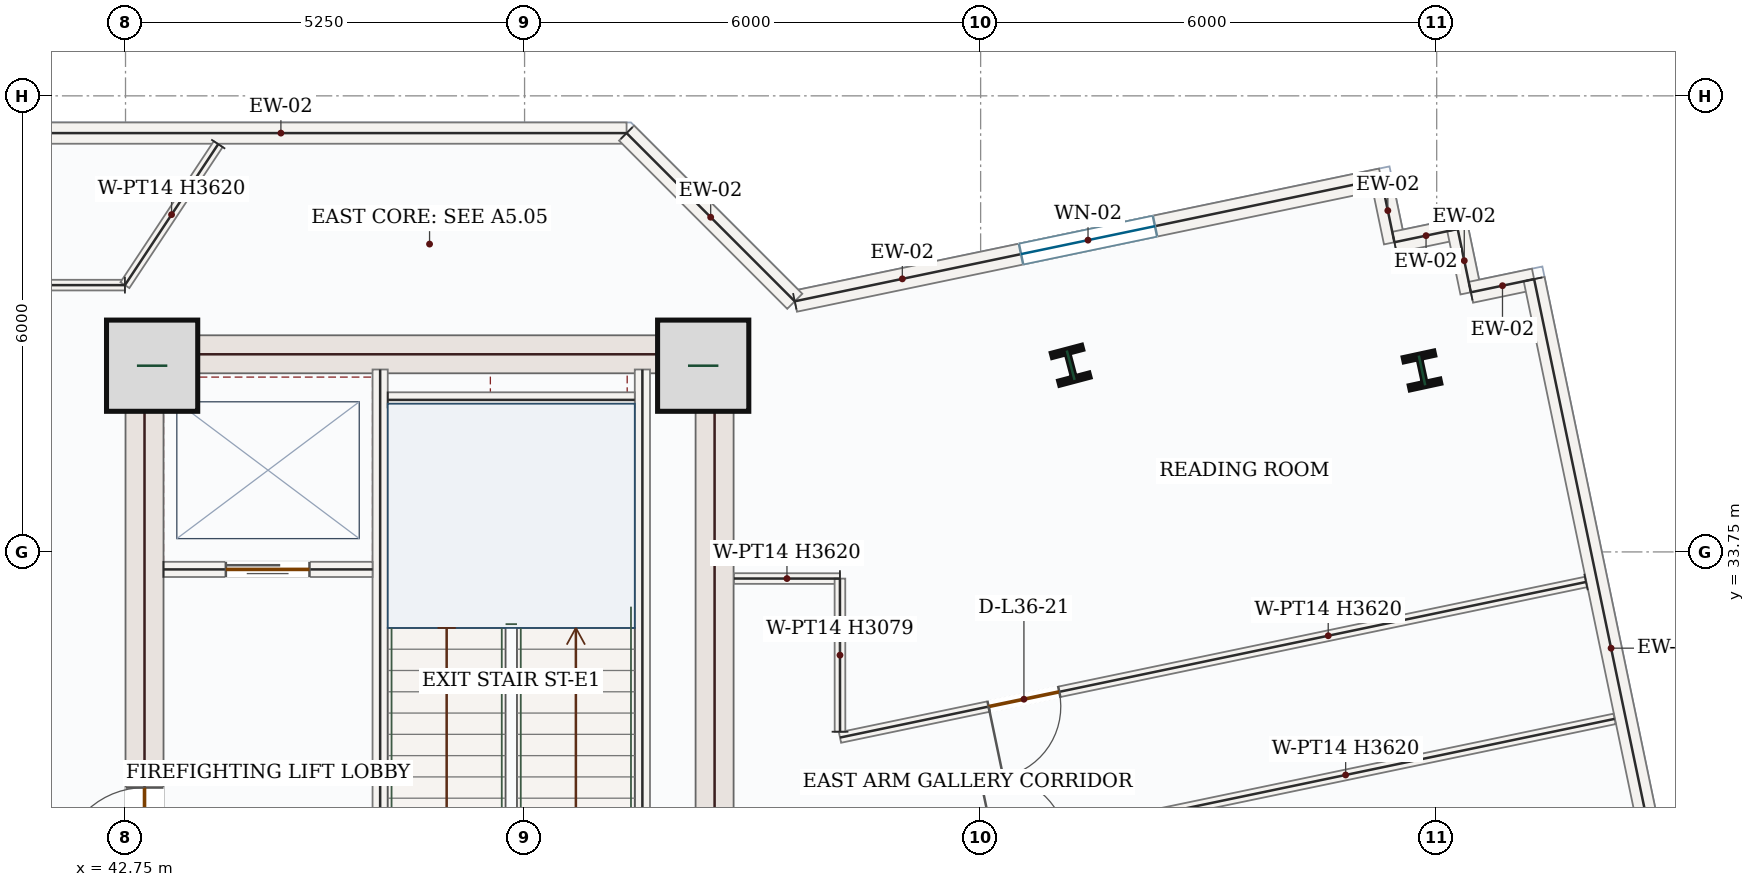
"""IFC4 building model, lengths in metres.
Left out: names, types, materials, properties, quantities, classifications, styles, units other than length and angle.
Written with IfcOpenShell. Run it as: python <this file> out.ifc"""

import sys

from ifc_helpers import new_model, si_unit, direction, frame, frame_2d, origin, origin_2d, place, context, subcontext, project, spatial, rectangle, i_section, extrude, source, transform, mapped, element, fill, save


model = new_model("IFC4")
c1 = context("Model", 3, precision=1e-05, world=origin(), true_north=direction((0.0, 1.0)))
c2 = subcontext(c1, "Body", "Model", "MODEL_VIEW")
j1 = project(units=[si_unit("LENGTHUNIT", "METRE"), si_unit("PLANEANGLEUNIT", "RADIAN")], contexts=[c1])
p1 = place(None, origin())
s1 = spatial("IfcSite", under=j1, at=p1, CompositionType="ELEMENT")
p2 = place(p1, origin())
s2 = spatial("IfcBuilding", under=s1, at=p2, CompositionType="ELEMENT")
p3 = place(p2, frame((0.0, 0.0, 159.0)))
s3 = spatial("IfcBuildingStorey", under=s2, at=p3, CompositionType="ELEMENT", Elevation=159.0)
p4 = place(p3, frame((43.0, 28.05, 0.0), z_axis=(0.0, 0.0, 1.0), x_axis=(0.0, 1.0, 0.0)))
e1 = element("IfcWall", 1, at=p4, inside=s3, PredefinedType="SHEAR", context=c2, shape_type="SweptSolid", body=[
    extrude(rectangle(XDim=8.55, YDim=0.5, at=frame_2d((4.275, 0.0))), origin(), (0.0, 0.0, 1.0), 3.62),
])
p5 = place(p4, frame((1.5, 0.0, 0.0)))
e2 = element("IfcOpeningElement", 2, at=p5, cuts=e1, PredefinedType="OPENING", context=c2, shape_type="SweptSolid", body=[
    extrude(rectangle(XDim=1.1, YDim=2.2, at=frame_2d((0.55, 1.1))), frame((0.0, 0.26, 0.0), z_axis=(0.0, -1.0, 0.0), x_axis=(1.0, 0.0, 0.0)), (0.0, 0.0, 1.0), 0.52),
])
m1 = source(origin(), c2, "Body", "SweptSolid", [
    extrude(rectangle(XDim=8.55, YDim=0.5, at=frame_2d((4.275, 0.0))), origin(), (0.0, 0.0, 1.0), 3.62),
])
p6 = place(p3, frame((50.5, 28.05, 0.0), z_axis=(0.0, 0.0, 1.0), x_axis=(0.0, 1.0, 0.0)))
e3 = element("IfcWall", 3, at=p6, inside=s3, PredefinedType="SHEAR", context=c2, shape_type="MappedRepresentation", body=[
    mapped(m1, transform((0.0, 0.0, 0.0), x_axis=(1.0, 0.0, 0.0), y_axis=(0.0, 1.0, 0.0), z_axis=(0.0, 0.0, 1.0), scale=1.0)),
])
m2 = source(origin(), c2, "Body", "SweptSolid", [
    extrude(rectangle(XDim=7.0, YDim=0.5, at=frame_2d((3.5, 0.0))), origin(), (0.0, 0.0, 1.0), 3.62),
])
p7 = place(p3, frame((43.25, 36.35, 0.0), z_axis=(0.0, 0.0, 1.0), x_axis=(1.0, 0.0, 0.0)))
e4 = element("IfcWall", 4, at=p7, inside=s3, PredefinedType="SHEAR", context=c2, shape_type="MappedRepresentation", body=[
    mapped(m2, transform((0.0, 0.0, 0.0), x_axis=(1.0, 0.0, 0.0), y_axis=(0.0, 1.0, 0.0), z_axis=(0.0, 0.0, 1.0), scale=1.0)),
])
m3 = source(origin(), c2, "Body", "SweptSolid", [
    extrude(rectangle(XDim=1.2, YDim=1.2, at=origin_2d()), origin(), (0.0, 0.0, 1.0), 3.9),
])
for number, where, z_axis, x_axis in (
    (5, (43.1, 36.2, 0.0), (0.0, 0.0, 1.0), (1.0, 0.0, 0.0)),
    (6, (50.35, 36.2, 0.0), (0.0, 0.0, 1.0), (1.0, 0.0, 0.0)),
):
    element("IfcColumn", number, at=place(p3, frame(where, z_axis=z_axis, x_axis=x_axis)), inside=s3, PredefinedType="COLUMN", context=c2, shape_type="MappedRepresentation", body=[
        mapped(m3, transform((0.0, 0.0, 0.0), x_axis=(1.0, 0.0, 0.0), y_axis=(0.0, 1.0, 0.0), z_axis=(0.0, 0.0, 1.0), scale=1.0)),
    ])
m4 = source(origin(), c2, "Body", "SweptSolid", [
    extrude(i_section(OverallWidth=0.412, OverallDepth=0.435, WebThickness=0.036, FlangeThickness=0.057, FilletRadius=0.018, at=origin_2d()), origin(), (0.0, 0.0, 1.0), 3.9),
])
for number, where, z_axis, x_axis in (
    (7, (55.185, 36.206, 0.0), (0.0, 0.0, 1.0), (0.967, 0.255, 0.0)),
    (8, (59.807, 36.137, 0.0), (0.0, 0.0, 1.0), (0.977, 0.211, 0.0)),
):
    element("IfcColumn", number, at=place(p3, frame(where, z_axis=z_axis, x_axis=x_axis)), inside=s3, PredefinedType="COLUMN", context=c2, shape_type="MappedRepresentation", body=[
        mapped(m4, transform((0.0, 0.0, 0.0), x_axis=(1.0, 0.0, 0.0), y_axis=(0.0, 1.0, 0.0), z_axis=(0.0, 0.0, 1.0), scale=1.0)),
    ])
p8 = place(p3, frame((51.555, 37.047, 0.0), z_axis=(0.0, 0.0, 1.0), x_axis=(0.978938136474, 0.204157108515, 0.0)))
e9 = element("IfcWall", 9, at=p8, inside=s3, PredefinedType="SOLIDWALL", context=c2, shape_type="SweptSolid", body=[
    extrude(rectangle(XDim=7.882, YDim=0.28, at=frame_2d((3.941, 0.0))), origin(), (0.0, 0.0, 1.0), 3.62),
])
p9 = place(p8, frame((3.041, 0.0, 0.85)))
e10 = element("IfcOpeningElement", 10, at=p9, cuts=e9, PredefinedType="OPENING", context=c2, shape_type="SweptSolid", body=[
    extrude(rectangle(XDim=1.8, YDim=1.75, at=frame_2d((0.9, 0.875))), frame((0.0, 0.15, 0.0), z_axis=(0.0, -1.0, 0.0), x_axis=(1.0, 0.0, 0.0)), (0.0, 0.0, 1.0), 0.3),
])
m5 = source(origin(), c2, "Body", "SweptSolid", [
    extrude(rectangle(XDim=0.85, YDim=0.28, at=frame_2d((0.425, 0.0))), origin(), (0.0, 0.0, 1.0), 3.62),
])
for number, where, z_axis, x_axis in (
    (11, (59.271, 38.656, 0.0), (0.0, 0.0, 1.0), (0.204, -0.979, 0.0)),
    (12, (59.444, 37.824, 0.0), (0.0, 0.0, 1.0), (0.979, 0.204, 0.0)),
):
    element("IfcWall", number, at=place(p3, frame(where, z_axis=z_axis, x_axis=x_axis)), inside=s3, PredefinedType="SOLIDWALL", context=c2, shape_type="MappedRepresentation", body=[
        mapped(m5, transform((0.0, 0.0, 0.0), x_axis=(1.0, 0.0, 0.0), y_axis=(0.0, 1.0, 0.0), z_axis=(0.0, 0.0, 1.0), scale=1.0)),
    ])
m6 = source(origin(), c2, "Body", "SweptSolid", [
    extrude(rectangle(XDim=0.85, YDim=0.28, at=frame_2d((0.425, 0.0))), origin(), (0.0, 0.0, 1.0), 3.62),
])
p10 = place(p3, frame((60.276, 37.998, 0.0), z_axis=(0.0, 0.0, 1.0), x_axis=(0.204447295999, -0.978877573121, 0.0)))
e13 = element("IfcWall", 13, at=p10, inside=s3, PredefinedType="SOLIDWALL", context=c2, shape_type="MappedRepresentation", body=[
    mapped(m6, transform((0.0, 0.0, 0.0), x_axis=(1.0, 0.0, 0.0), y_axis=(0.0, 1.0, 0.0), z_axis=(0.0, 0.0, 1.0), scale=1.0)),
])
p11 = place(p3, frame((60.45, 37.166, 0.0), z_axis=(0.0, 0.0, 1.0), x_axis=(0.978923028084, 0.20422954019, 0.0)))
e14 = element("IfcWall", 14, at=p11, inside=s3, PredefinedType="SOLIDWALL", context=c2, shape_type="MappedRepresentation", body=[
    mapped(m5, transform((0.0, 0.0, 0.0), x_axis=(1.0, 0.0, 0.0), y_axis=(0.0, 1.0, 0.0), z_axis=(0.0, 0.0, 1.0), scale=1.0)),
])
m7 = source(origin(), c2, "Body", "SweptSolid", [
    extrude(rectangle(XDim=9.92, YDim=0.28, at=frame_2d((4.96, 0.0))), origin(), (0.0, 0.0, 1.0), 3.62),
])
p12 = place(p3, frame((61.282, 37.339, 0.0), z_axis=(0.0, 0.0, 1.0), x_axis=(0.204150812873, -0.978939449406, 0.0)))
e15 = element("IfcWall", 15, at=p12, inside=s3, PredefinedType="SOLIDWALL", context=c2, shape_type="MappedRepresentation", body=[
    mapped(m7, transform((0.0, 0.0, 0.0), x_axis=(1.0, 0.0, 0.0), y_axis=(0.0, 1.0, 0.0), z_axis=(0.0, 0.0, 1.0), scale=1.0)),
])
m8 = source(origin(), c2, "Body", "SweptSolid", [
    extrude(rectangle(XDim=9.095, YDim=0.28, at=frame_2d((4.548, 0.0))), origin(), (0.0, 0.0, 1.0), 3.62),
])
p13 = place(p3, frame((40.247, 39.26, 0.0), z_axis=(0.0, 0.0, 1.0), x_axis=(1.0, 0.0, 0.0)))
e16 = element("IfcWall", 16, at=p13, inside=s3, PredefinedType="SOLIDWALL", context=c2, shape_type="MappedRepresentation", body=[
    mapped(m8, transform((0.0, 0.0, 0.0), x_axis=(1.0, 0.0, 0.0), y_axis=(0.0, 1.0, 0.0), z_axis=(0.0, 0.0, 1.0), scale=1.0)),
])
m9 = source(origin(), c2, "Body", "SweptSolid", [
    extrude(rectangle(XDim=3.129, YDim=0.28, at=frame_2d((1.565, 0.0))), origin(), (0.0, 0.0, 1.0), 3.62),
])
p14 = place(p3, frame((49.342, 39.26, 0.0), z_axis=(0.0, 0.0, 1.0), x_axis=(0.707067771627, -0.707145788594, 0.0)))
e17 = element("IfcWall", 17, at=p14, inside=s3, PredefinedType="SOLIDWALL", context=c2, shape_type="MappedRepresentation", body=[
    mapped(m9, transform((0.0, 0.0, 0.0), x_axis=(1.0, 0.0, 0.0), y_axis=(0.0, 1.0, 0.0), z_axis=(0.0, 0.0, 1.0), scale=1.0)),
])
m10 = source(origin(), c2, "Body", "SweptSolid", [
    extrude(rectangle(XDim=7.87, YDim=0.2, at=frame_2d((3.935, 0.0))), origin(), (0.0, 0.0, 1.0), 3.62),
])
p15 = place(p3, frame((49.55, 28.28, 0.0), z_axis=(0.0, 0.0, 1.0), x_axis=(0.0, 1.0, 0.0)))
e18 = element("IfcWall", 18, at=p15, inside=s3, PredefinedType="SOLIDWALL", context=c2, shape_type="MappedRepresentation", body=[
    mapped(m10, transform((0.0, 0.0, 0.0), x_axis=(1.0, 0.0, 0.0), y_axis=(0.0, 1.0, 0.0), z_axis=(0.0, 0.0, 1.0), scale=1.0)),
])
p16 = place(p3, frame((46.1, 28.15, 0.0), z_axis=(0.0, 0.0, 1.0), x_axis=(0.0, 1.0, 0.0)))
e19 = element("IfcWall", 19, at=p16, inside=s3, PredefinedType="SOLIDWALL", context=c2, shape_type="SweptSolid", body=[
    extrude(rectangle(XDim=8.0, YDim=0.2, at=frame_2d((4.0, 0.0))), origin(), (0.0, 0.0, 1.0), 3.62),
])
p17 = place(p16, frame((0.4, 0.0, 0.0)))
e20 = element("IfcOpeningElement", 20, at=p17, cuts=e19, PredefinedType="OPENING", context=c2, shape_type="SweptSolid", body=[
    extrude(rectangle(XDim=1.05, YDim=2.15, at=frame_2d((0.525, 1.075))), frame((0.0, 0.11, 0.0), z_axis=(0.0, -1.0, 0.0), x_axis=(1.0, 0.0, 0.0)), (0.0, 0.0, 1.0), 0.22),
])
m11 = source(origin(), c2, "Body", "SweptSolid", [
    extrude(rectangle(XDim=3.25, YDim=0.2, at=frame_2d((1.625, 0.0))), origin(), (0.0, 0.0, 1.0), 3.62),
])
p18 = place(p3, frame((46.2, 35.75, 0.0), z_axis=(0.0, 0.0, 1.0), x_axis=(1.0, 0.0, 0.0)))
e21 = element("IfcWall", 21, at=p18, inside=s3, PredefinedType="SOLIDWALL", context=c2, shape_type="MappedRepresentation", body=[
    mapped(m11, transform((0.0, 0.0, 0.0), x_axis=(1.0, 0.0, 0.0), y_axis=(0.0, 1.0, 0.0), z_axis=(0.0, 0.0, 1.0), scale=1.0)),
])
p19 = place(p3, frame((43.25, 33.52, 0.0), z_axis=(0.0, 0.0, 1.0), x_axis=(1.0, 0.0, 0.0)))
e22 = element("IfcWall", 22, at=p19, inside=s3, PredefinedType="SOLIDWALL", context=c2, shape_type="SweptSolid", body=[
    extrude(rectangle(XDim=2.75, YDim=0.2, at=frame_2d((1.375, 0.0))), origin(), (0.0, 0.0, 1.0), 3.62),
])
p20 = place(p19, frame((0.82, 0.0, 0.0)))
e23 = element("IfcOpeningElement", 23, at=p20, cuts=e22, PredefinedType="OPENING", context=c2, shape_type="SweptSolid", body=[
    extrude(rectangle(XDim=1.1, YDim=2.15, at=frame_2d((0.55, 1.075))), frame((0.0, 0.11, 0.0), z_axis=(0.0, -1.0, 0.0), x_axis=(1.0, 0.0, 0.0)), (0.0, 0.0, 1.0), 0.22),
])
p21 = place(p3, frame((42.742, 37.26, 0.0), z_axis=(0.0, 0.0, 1.0), x_axis=(-1.0, 0.0, 0.0)))
e24 = element("IfcWall", 24, at=p21, inside=s3, PredefinedType="PARTITIONING", context=c2, shape_type="SweptSolid", body=[
    extrude(rectangle(XDim=7.942, YDim=0.14, at=frame_2d((3.971, 0.0))), origin(), (0.0, 0.0, 1.0), 3.62),
])
p22 = place(p21, frame((5.454, 0.0, 0.0)))
e25 = element("IfcOpeningElement", 25, at=p22, cuts=e24, PredefinedType="OPENING", context=c2, shape_type="SweptSolid", body=[
    extrude(rectangle(XDim=0.95, YDim=2.15, at=frame_2d((0.475, 1.075))), frame((0.0, 0.08, 0.0), z_axis=(0.0, -1.0, 0.0), x_axis=(1.0, 0.0, 0.0)), (0.0, 0.0, 1.0), 0.16),
])
m12 = source(origin(), c2, "Body", "SweptSolid", [
    extrude(rectangle(XDim=2.224, YDim=0.14, at=frame_2d((1.112, 0.0))), origin(), (0.0, 0.0, 1.0), 3.62),
])
p23 = place(p3, frame((43.969, 39.115, 0.0), z_axis=(0.0, 0.0, 1.0), x_axis=(-0.551783828078, -0.833987174405, 0.0)))
e26 = element("IfcWall", 26, at=p23, inside=s3, PredefinedType="PARTITIONING", context=c2, shape_type="MappedRepresentation", body=[
    mapped(m12, transform((0.0, 0.0, 0.0), x_axis=(1.0, 0.0, 0.0), y_axis=(0.0, 1.0, 0.0), z_axis=(0.0, 0.0, 1.0), scale=1.0)),
])
p24 = place(p3, frame((52.15, 29.428, 0.0), z_axis=(0.0, 0.0, 1.0), x_axis=(0.978935516763, 0.204169669688, 0.0)))
e27 = element("IfcWall", 27, at=p24, inside=s3, PredefinedType="PARTITIONING", context=c2, shape_type="SweptSolid", body=[
    extrude(rectangle(XDim=10.409, YDim=0.14, at=frame_2d((5.205, 0.0))), origin(), (0.0, 0.0, 1.0), 3.62),
])
p25 = place(p24, frame((2.081, 0.0, 0.0)))
e28 = element("IfcOpeningElement", 28, at=p25, cuts=e27, PredefinedType="OPENING", context=c2, shape_type="SweptSolid", body=[
    extrude(rectangle(XDim=0.95, YDim=2.15, at=frame_2d((0.475, 1.075))), frame((0.0, 0.08, 0.0), z_axis=(0.0, -1.0, 0.0), x_axis=(1.0, 0.0, 0.0)), (0.0, 0.0, 1.0), 0.16),
])
m13 = source(origin(), c2, "Body", "SweptSolid", [
    extrude(rectangle(XDim=1.394, YDim=0.14, at=frame_2d((0.697, 0.0))), origin(), (0.0, 0.0, 1.0), 3.62),
])
p26 = place(p3, frame((52.149, 33.399, 0.0), z_axis=(0.0, 0.0, 1.0), x_axis=(-0.999999754632, 0.000700525222, 0.0)))
e29 = element("IfcWall", 29, at=p26, inside=s3, PredefinedType="PARTITIONING", context=c2, shape_type="MappedRepresentation", body=[
    mapped(m13, transform((0.0, 0.0, 0.0), x_axis=(1.0, 0.0, 0.0), y_axis=(0.0, 1.0, 0.0), z_axis=(0.0, 0.0, 1.0), scale=1.0)),
])
p27 = place(p3, frame((61.965, 33.354, 0.0), z_axis=(0.0, 0.0, 1.0), x_axis=(-0.978942518705, -0.204136094483, 0.0)))
e30 = element("IfcWall", 30, at=p27, inside=s3, PredefinedType="PARTITIONING", context=c2, shape_type="SweptSolid", body=[
    extrude(rectangle(XDim=10.026, YDim=0.14, at=frame_2d((5.013, 0.0))), origin(), (0.0, 0.0, 1.0), 3.62),
])
p28 = place(p27, frame((7.079, 0.0, 0.0)))
e31 = element("IfcOpeningElement", 31, at=p28, cuts=e30, PredefinedType="OPENING", context=c2, shape_type="SweptSolid", body=[
    extrude(rectangle(XDim=0.95, YDim=2.15, at=frame_2d((0.475, 1.075))), frame((0.0, 0.08, 0.0), z_axis=(0.0, -1.0, 0.0), x_axis=(1.0, 0.0, 0.0)), (0.0, 0.0, 1.0), 0.16),
])
m14 = source(origin(), c2, "Body", "SweptSolid", [
    extrude(rectangle(XDim=2.014, YDim=0.14, at=frame_2d((1.007, 0.0))), origin(), (0.0, 0.0, 1.0), 3.079),
])
p29 = place(p3, frame((52.15, 31.385, 0.0), z_axis=(0.0, 0.0, 1.0), x_axis=(-0.000484789665, 0.999999882489, 0.0)))
e32 = element("IfcWall", 32, at=p29, inside=s3, PredefinedType="PARTITIONING", context=c2, shape_type="MappedRepresentation", body=[
    mapped(m14, transform((0.0, 0.0, 0.0), x_axis=(1.0, 0.0, 0.0), y_axis=(0.0, 1.0, 0.0), z_axis=(0.0, 0.0, 1.0), scale=1.0)),
])
m15 = source(origin(), c2, "Body", "SweptSolid", [
    extrude(rectangle(XDim=1.8, YDim=1.75, at=frame_2d((0.9, 0.875))), frame((0.0, 0.03, 0.0), z_axis=(0.0, -1.0, 0.0), x_axis=(1.0, 0.0, 0.0)), (0.0, 0.0, 1.0), 0.06),
])
p30 = place(p9, origin())
e33 = element("IfcWindow", 33, at=p30, inside=s3, PartitioningType="DOUBLE_PANEL_VERTICAL", PredefinedType="WINDOW", context=c2, shape_type="MappedRepresentation", body=[
    mapped(m15, transform((0.0, 0.0, 0.0), x_axis=(1.0, 0.0, 0.0), y_axis=(0.0, 1.0, 0.0), z_axis=(0.0, 0.0, 1.0), scale=1.0)),
])
fill(e10, e33)
m16 = source(origin(), c2, "Body", "SweptSolid", [
    extrude(rectangle(XDim=1.1, YDim=2.15, at=frame_2d((0.55, 1.075))), frame((0.0, 0.025, 0.0), z_axis=(0.0, -1.0, 0.0), x_axis=(1.0, 0.0, 0.0)), (0.0, 0.0, 1.0), 0.05),
])
p31 = place(p20, origin())
e34 = element("IfcDoor", 34, at=p31, inside=s3, OperationType="DOUBLE_DOOR_SLIDING", PredefinedType="DOOR", context=c2, shape_type="MappedRepresentation", body=[
    mapped(m16, transform((0.0, 0.0, 0.0), x_axis=(1.0, 0.0, 0.0), y_axis=(0.0, 1.0, 0.0), z_axis=(0.0, 0.0, 1.0), scale=1.0)),
])
fill(e23, e34)
m17 = source(origin(), c2, "Body", "SweptSolid", [
    extrude(rectangle(XDim=1.1, YDim=2.2, at=frame_2d((0.55, 1.1))), frame((0.0, 0.025, 0.0), z_axis=(0.0, -1.0, 0.0), x_axis=(1.0, 0.0, 0.0)), (0.0, 0.0, 1.0), 0.05),
])
p32 = place(p5, origin())
e35 = element("IfcDoor", 35, at=p32, inside=s3, OperationType="SINGLE_SWING_LEFT", PredefinedType="DOOR", context=c2, shape_type="MappedRepresentation", body=[
    mapped(m17, transform((0.0, 0.0, 0.0), x_axis=(1.0, 0.0, 0.0), y_axis=(0.0, 1.0, 0.0), z_axis=(0.0, 0.0, 1.0), scale=1.0)),
])
fill(e2, e35)
m18 = source(origin(), c2, "Body", "SweptSolid", [
    extrude(rectangle(XDim=0.95, YDim=2.15, at=frame_2d((0.475, 1.075))), frame((0.0, 0.025, 0.0), z_axis=(0.0, -1.0, 0.0), x_axis=(1.0, 0.0, 0.0)), (0.0, 0.0, 1.0), 0.05),
])
p33 = place(p28, origin())
e36 = element("IfcDoor", 36, at=p33, inside=s3, OperationType="SINGLE_SWING_RIGHT", PredefinedType="DOOR", context=c2, shape_type="MappedRepresentation", body=[
    mapped(m18, transform((0.0, 0.0, 0.0), x_axis=(1.0, 0.0, 0.0), y_axis=(0.0, 1.0, 0.0), z_axis=(0.0, 0.0, 1.0), scale=1.0)),
])
fill(e31, e36)
save(model, sys.argv[1])
